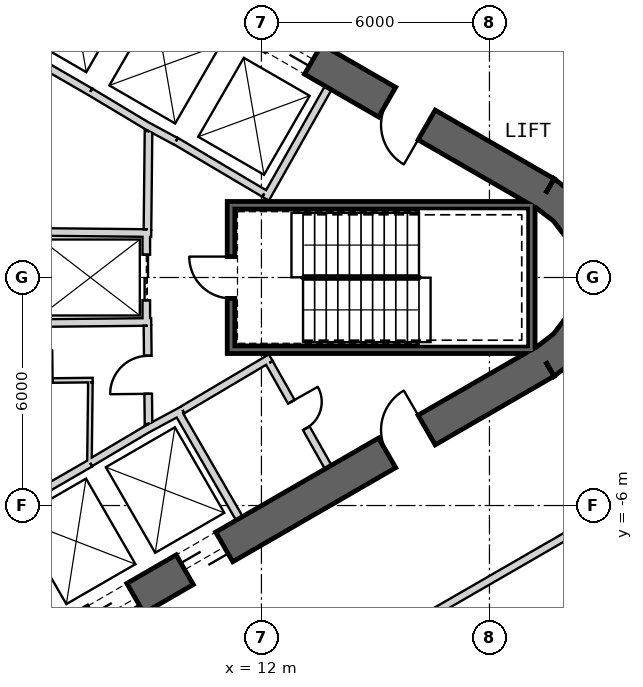
"""IFC4 building model, lengths in metres.
Left out: names, types, materials, properties, quantities, classifications, styles, units other than length and angle.
Written with IfcOpenShell. Run it as: python <this file> out.ifc"""

import sys

from ifc_helpers import new_model, si_unit, direction, frame, frame_2d, origin, place, context, subcontext, project, spatial, polyline, rectangle, outline, extrude, element, fill, save


model = new_model("IFC4")
c1 = context("Model", 3, precision=1e-05, world=origin(), true_north=direction((0.0, 1.0)))
c2 = subcontext(c1, "Body", "Model", "MODEL_VIEW")
j1 = project(units=[si_unit("LENGTHUNIT", "METRE"), si_unit("PLANEANGLEUNIT", "RADIAN")], contexts=[c1])
p1 = place(None, origin())
s1 = spatial("IfcSite", under=j1, at=p1, CompositionType="ELEMENT")
p2 = place(p1, origin())
s2 = spatial("IfcBuilding", under=s1, at=p2, CompositionType="ELEMENT")
p3 = place(p2, frame((0.0, 0.0, 45.5)))
s3 = spatial("IfcBuildingStorey", under=s2, at=p3, CompositionType="ELEMENT", Elevation=45.5)
p4 = place(p3, frame((19.475, 2.208, 0.0), z_axis=(0.0, 0.0, 1.0), x_axis=(-0.866028369851, 0.499994862586, 0.0)))
e1 = element("IfcWall", 1, at=p4, inside=s3, PredefinedType="SHEAR", context=c2, shape_type="SweptSolid", body=[
    extrude(rectangle(XDim=31.523, YDim=0.9, at=frame_2d((15.762, 0.0))), origin(), (0.0, 0.0, 1.0), 4.1),
])
p5 = place(p4, frame((7.062, 0.0, 0.0)))
e2 = element("IfcOpeningElement", 2, at=p5, cuts=e1, PredefinedType="OPENING", context=c2, shape_type="SweptSolid", body=[
    extrude(rectangle(XDim=1.2, YDim=2.4, at=frame_2d((0.6, 1.2))), frame((0.0, 0.46, 0.0), z_axis=(0.0, -1.0, 0.0), x_axis=(1.0, 0.0, 0.0)), (0.0, 0.0, 1.0), 0.92),
])
p6 = place(p4, frame((9.762, 0.0, 0.0)))
e3 = element("IfcOpeningElement", 3, at=p6, cuts=e1, PredefinedType="OPENING", context=c2, shape_type="SweptSolid", body=[
    extrude(rectangle(XDim=1.2, YDim=2.4, at=frame_2d((0.6, 1.2))), frame((0.0, 0.46, 0.0), z_axis=(0.0, -1.0, 0.0), x_axis=(1.0, 0.0, 0.0)), (0.0, 0.0, 1.0), 0.92),
])
p7 = place(p4, frame((12.462, 0.0, 0.0)))
e4 = element("IfcOpeningElement", 4, at=p7, cuts=e1, PredefinedType="OPENING", context=c2, shape_type="SweptSolid", body=[
    extrude(rectangle(XDim=1.2, YDim=2.4, at=frame_2d((0.6, 1.2))), frame((0.0, 0.46, 0.0), z_axis=(0.0, -1.0, 0.0), x_axis=(1.0, 0.0, 0.0)), (0.0, 0.0, 1.0), 0.92),
])
p8 = place(p4, frame((15.162, 0.0, 0.0)))
e5 = element("IfcOpeningElement", 5, at=p8, cuts=e1, PredefinedType="OPENING", context=c2, shape_type="SweptSolid", body=[
    extrude(rectangle(XDim=1.2, YDim=2.4, at=frame_2d((0.6, 1.2))), frame((0.0, 0.46, 0.0), z_axis=(0.0, -1.0, 0.0), x_axis=(1.0, 0.0, 0.0)), (0.0, 0.0, 1.0), 0.92),
])
p9 = place(p4, frame((17.862, 0.0, 0.0)))
e6 = element("IfcOpeningElement", 6, at=p9, cuts=e1, PredefinedType="OPENING", context=c2, shape_type="SweptSolid", body=[
    extrude(rectangle(XDim=1.2, YDim=2.4, at=frame_2d((0.6, 1.2))), frame((0.0, 0.46, 0.0), z_axis=(0.0, -1.0, 0.0), x_axis=(1.0, 0.0, 0.0)), (0.0, 0.0, 1.0), 0.92),
])
p10 = place(p4, frame((20.562, 0.0, 0.0)))
e7 = element("IfcOpeningElement", 7, at=p10, cuts=e1, PredefinedType="OPENING", context=c2, shape_type="SweptSolid", body=[
    extrude(rectangle(XDim=1.2, YDim=2.4, at=frame_2d((0.6, 1.2))), frame((0.0, 0.46, 0.0), z_axis=(0.0, -1.0, 0.0), x_axis=(1.0, 0.0, 0.0)), (0.0, 0.0, 1.0), 0.92),
])
p11 = place(p4, frame((23.262, 0.0, 0.0)))
e8 = element("IfcOpeningElement", 8, at=p11, cuts=e1, PredefinedType="OPENING", context=c2, shape_type="SweptSolid", body=[
    extrude(rectangle(XDim=1.2, YDim=2.4, at=frame_2d((0.6, 1.2))), frame((0.0, 0.46, 0.0), z_axis=(0.0, -1.0, 0.0), x_axis=(1.0, 0.0, 0.0)), (0.0, 0.0, 1.0), 0.92),
])
p12 = place(p4, frame((3.612, 0.0, 0.0)))
e9 = element("IfcOpeningElement", 9, at=p12, cuts=e1, PredefinedType="OPENING", context=c2, shape_type="SweptSolid", body=[
    extrude(rectangle(XDim=1.2, YDim=2.4, at=frame_2d((0.6, 1.2))), frame((0.0, 0.46, 0.0), z_axis=(0.0, -1.0, 0.0), x_axis=(1.0, 0.0, 0.0)), (0.0, 0.0, 1.0), 0.92),
])
p13 = place(p4, frame((26.712, 0.0, 0.0)))
e10 = element("IfcOpeningElement", 10, at=p13, cuts=e1, PredefinedType="OPENING", context=c2, shape_type="SweptSolid", body=[
    extrude(rectangle(XDim=1.2, YDim=2.4, at=frame_2d((0.6, 1.2))), frame((0.0, 0.46, 0.0), z_axis=(0.0, -1.0, 0.0), x_axis=(1.0, 0.0, 0.0)), (0.0, 0.0, 1.0), 0.92),
])
p14 = place(p3, frame((-7.825, -17.97, 0.0), z_axis=(0.0, 0.0, 1.0), x_axis=(0.866028369851, 0.499994862586, 0.0)))
e11 = element("IfcWall", 11, at=p14, inside=s3, PredefinedType="SHEAR", context=c2, shape_type="SweptSolid", body=[
    extrude(rectangle(XDim=31.523, YDim=0.9, at=frame_2d((15.762, 0.0))), origin(), (0.0, 0.0, 1.0), 4.1),
])
p15 = place(p14, frame((7.062, 0.0, 0.0)))
e12 = element("IfcOpeningElement", 12, at=p15, cuts=e11, PredefinedType="OPENING", context=c2, shape_type="SweptSolid", body=[
    extrude(rectangle(XDim=1.2, YDim=2.4, at=frame_2d((0.6, 1.2))), frame((0.0, 0.46, 0.0), z_axis=(0.0, -1.0, 0.0), x_axis=(1.0, 0.0, 0.0)), (0.0, 0.0, 1.0), 0.92),
])
p16 = place(p14, frame((9.762, 0.0, 0.0)))
e13 = element("IfcOpeningElement", 13, at=p16, cuts=e11, PredefinedType="OPENING", context=c2, shape_type="SweptSolid", body=[
    extrude(rectangle(XDim=1.2, YDim=2.4, at=frame_2d((0.6, 1.2))), frame((0.0, 0.46, 0.0), z_axis=(0.0, -1.0, 0.0), x_axis=(1.0, 0.0, 0.0)), (0.0, 0.0, 1.0), 0.92),
])
p17 = place(p14, frame((12.462, 0.0, 0.0)))
e14 = element("IfcOpeningElement", 14, at=p17, cuts=e11, PredefinedType="OPENING", context=c2, shape_type="SweptSolid", body=[
    extrude(rectangle(XDim=1.2, YDim=2.4, at=frame_2d((0.6, 1.2))), frame((0.0, 0.46, 0.0), z_axis=(0.0, -1.0, 0.0), x_axis=(1.0, 0.0, 0.0)), (0.0, 0.0, 1.0), 0.92),
])
p18 = place(p14, frame((15.162, 0.0, 0.0)))
e15 = element("IfcOpeningElement", 15, at=p18, cuts=e11, PredefinedType="OPENING", context=c2, shape_type="SweptSolid", body=[
    extrude(rectangle(XDim=1.2, YDim=2.4, at=frame_2d((0.6, 1.2))), frame((0.0, 0.46, 0.0), z_axis=(0.0, -1.0, 0.0), x_axis=(1.0, 0.0, 0.0)), (0.0, 0.0, 1.0), 0.92),
])
p19 = place(p14, frame((17.862, 0.0, 0.0)))
e16 = element("IfcOpeningElement", 16, at=p19, cuts=e11, PredefinedType="OPENING", context=c2, shape_type="SweptSolid", body=[
    extrude(rectangle(XDim=1.2, YDim=2.4, at=frame_2d((0.6, 1.2))), frame((0.0, 0.46, 0.0), z_axis=(0.0, -1.0, 0.0), x_axis=(1.0, 0.0, 0.0)), (0.0, 0.0, 1.0), 0.92),
])
p20 = place(p14, frame((20.562, 0.0, 0.0)))
e17 = element("IfcOpeningElement", 17, at=p20, cuts=e11, PredefinedType="OPENING", context=c2, shape_type="SweptSolid", body=[
    extrude(rectangle(XDim=1.2, YDim=2.4, at=frame_2d((0.6, 1.2))), frame((0.0, 0.46, 0.0), z_axis=(0.0, -1.0, 0.0), x_axis=(1.0, 0.0, 0.0)), (0.0, 0.0, 1.0), 0.92),
])
p21 = place(p14, frame((26.712, 0.0, 0.0)))
e18 = element("IfcOpeningElement", 18, at=p21, cuts=e11, PredefinedType="OPENING", context=c2, shape_type="SweptSolid", body=[
    extrude(rectangle(XDim=1.2, YDim=2.4, at=frame_2d((0.6, 1.2))), frame((0.0, 0.46, 0.0), z_axis=(0.0, -1.0, 0.0), x_axis=(1.0, 0.0, 0.0)), (0.0, 0.0, 1.0), 0.92),
])
p22 = place(p14, frame((3.612, 0.0, 0.0)))
e19 = element("IfcOpeningElement", 19, at=p22, cuts=e11, PredefinedType="OPENING", context=c2, shape_type="SweptSolid", body=[
    extrude(rectangle(XDim=1.2, YDim=2.4, at=frame_2d((0.6, 1.2))), frame((0.0, 0.46, 0.0), z_axis=(0.0, -1.0, 0.0), x_axis=(1.0, 0.0, 0.0)), (0.0, 0.0, 1.0), 0.92),
])
p23 = place(p3, origin())
e20 = element("IfcWall", 20, at=p23, inside=s3, PredefinedType="SHEAR", context=c2, shape_type="SweptSolid", body=[
    extrude(outline(polyline([(19.7, -2.598), (20.321, -2.121), (20.798, -1.5), (21.098, -0.777), (21.2, 0.0), (21.098, 0.777), (20.798, 1.5), (20.321, 2.121), (19.7, 2.598), (19.25, 1.819), (19.685, 1.485), (20.019, 1.05), (20.229, 0.543), (20.3, 0.0), (20.229, -0.543), (20.019, -1.05), (19.685, -1.485), (19.25, -1.819), (19.7, -2.598)])), origin(), (0.0, 0.0, 1.0), 4.1),
])
p24 = place(p3, frame((7.497, 4.886, 0.0), z_axis=(0.0, 0.0, 1.0), x_axis=(-0.866030989016, 0.499990325971, 0.0)))
e21 = element("IfcWall", 21, at=p24, inside=s3, PredefinedType="PLUMBINGWALL", context=c2, shape_type="SweptSolid", body=[
    extrude(rectangle(XDim=8.1, YDim=0.2, at=frame_2d((4.05, 0.0))), origin(), (0.0, 0.0, 1.0), 3.8),
])
p25 = place(p3, frame((12.11, 2.073, 0.0), z_axis=(0.0, 0.0, 1.0), x_axis=(0.49196600604, 0.870614408852, 0.0)))
e22 = element("IfcWall", 22, at=p25, inside=s3, PredefinedType="PLUMBINGWALL", context=c2, shape_type="SweptSolid", body=[
    extrude(rectangle(XDim=3.35, YDim=0.2, at=frame_2d((1.675, 0.0))), origin(), (0.0, 0.0, 1.0), 3.8),
])
p26 = place(p3, frame((12.073, 2.211, 0.0), z_axis=(0.0, 0.0, 1.0), x_axis=(-0.860438357912, 0.509554542943, 0.0)))
e23 = element("IfcWall", 23, at=p26, inside=s3, PredefinedType="PLUMBINGWALL", context=c2, shape_type="SweptSolid", body=[
    extrude(rectangle(XDim=2.7, YDim=0.2, at=frame_2d((1.35, 0.0))), origin(), (0.0, 0.0, 1.0), 3.8),
])
p27 = place(p3, frame((9.748, 3.583, 0.0), z_axis=(0.0, 0.0, 1.0), x_axis=(-0.880917147855, 0.473270513147, 0.0)))
e24 = element("IfcWall", 24, at=p27, inside=s3, PredefinedType="PLUMBINGWALL", context=c2, shape_type="SweptSolid", body=[
    extrude(rectangle(XDim=0.878, YDim=0.2, at=frame_2d((0.439, 0.0))), origin(), (0.0, 0.0, 1.0), 3.8),
])
p28 = place(p3, frame((9.079, 3.937, 0.0), z_axis=(0.0, 0.0, 1.0), x_axis=(-0.857516281273, 0.51445682749, 0.0)))
e25 = element("IfcWall", 25, at=p28, inside=s3, PredefinedType="PLUMBINGWALL", context=c2, shape_type="SweptSolid", body=[
    extrude(rectangle(XDim=1.845, YDim=0.2, at=frame_2d((0.922, 0.0))), origin(), (0.0, 0.0, 1.0), 3.8),
])
p29 = place(p3, frame((0.483, -8.936, 0.0), z_axis=(0.0, 0.0, 1.0), x_axis=(0.866030989016, 0.499990325971, 0.0)))
e26 = element("IfcWall", 26, at=p29, inside=s3, PredefinedType="PLUMBINGWALL", context=c2, shape_type="SweptSolid", body=[
    extrude(rectangle(XDim=8.1, YDim=0.2, at=frame_2d((4.05, 0.0))), origin(), (0.0, 0.0, 1.0), 3.8),
])
p30 = place(p3, frame((9.795, -3.525, 0.0), z_axis=(0.0, 0.0, 1.0), x_axis=(0.499984717929, -0.866034226713, 0.0)))
e27 = element("IfcWall", 27, at=p30, inside=s3, PredefinedType="PLUMBINGWALL", context=c2, shape_type="SweptSolid", body=[
    extrude(rectangle(XDim=3.25, YDim=0.2, at=frame_2d((1.625, 0.0))), origin(), (0.0, 0.0, 1.0), 3.8),
])
p31 = place(p3, frame((8.974, -3.999, 0.0), z_axis=(0.0, 0.0, 1.0), x_axis=(0.880907015104, 0.473289373154, 0.0)))
e28 = element("IfcWall", 28, at=p31, inside=s3, PredefinedType="PLUMBINGWALL", context=c2, shape_type="SweptSolid", body=[
    extrude(rectangle(XDim=1.078, YDim=0.2, at=frame_2d((0.539, 0.0))), origin(), (0.0, 0.0, 1.0), 3.8),
])
p32 = place(p3, frame((7.493, -4.878, 0.0), z_axis=(0.0, 0.0, 1.0), x_axis=(0.859981807212, 0.510324691999, 0.0)))
e29 = element("IfcWall", 29, at=p32, inside=s3, PredefinedType="PLUMBINGWALL", context=c2, shape_type="SweptSolid", body=[
    extrude(rectangle(XDim=1.845, YDim=0.2, at=frame_2d((0.922, 0.0))), origin(), (0.0, 0.0, 1.0), 3.8),
])
p33 = place(p3, frame((19.2, 1.9, -0.3), z_axis=(0.0, 0.0, 1.0), x_axis=(-1.0, 0.0, 0.0)))
e30 = element("IfcWall", 30, at=p33, inside=s3, PredefinedType="SHEAR", context=c2, shape_type="SweptSolid", body=[
    extrude(rectangle(XDim=8.1, YDim=0.2, at=frame_2d((4.05, 0.0))), origin(), (0.0, 0.0, 1.0), 4.1),
])
p34 = place(p3, frame((19.1, -2.0, -0.3), z_axis=(0.0, 0.0, 1.0), x_axis=(0.0, 1.0, 0.0)))
e31 = element("IfcWall", 31, at=p34, inside=s3, PredefinedType="SHEAR", context=c2, shape_type="SweptSolid", body=[
    extrude(rectangle(XDim=3.8, YDim=0.2, at=frame_2d((1.9, 0.0))), origin(), (0.0, 0.0, 1.0), 4.1),
])
p35 = place(p3, frame((11.1, -1.9, -0.3), z_axis=(0.0, 0.0, 1.0), x_axis=(1.0, 0.0, 0.0)))
e32 = element("IfcWall", 32, at=p35, inside=s3, PredefinedType="SHEAR", context=c2, shape_type="SweptSolid", body=[
    extrude(rectangle(XDim=7.9, YDim=0.2, at=frame_2d((3.95, 0.0))), origin(), (0.0, 0.0, 1.0), 4.1),
])
p36 = place(p3, frame((11.2, -1.8, -0.3), z_axis=(0.0, 0.0, 1.0), x_axis=(0.0, 1.0, 0.0)))
e33 = element("IfcWall", 33, at=p36, inside=s3, PredefinedType="SHEAR", context=c2, shape_type="SweptSolid", body=[
    extrude(rectangle(XDim=3.6, YDim=0.2, at=frame_2d((1.8, 0.0))), origin(), (0.0, 0.0, 1.0), 4.1),
])
p37 = place(p36, frame((1.25, 0.0, 0.3)))
e34 = element("IfcOpeningElement", 34, at=p37, cuts=e33, PredefinedType="OPENING", context=c2, shape_type="SweptSolid", body=[
    extrude(rectangle(XDim=1.1, YDim=2.1, at=frame_2d((0.55, 1.05))), frame((0.0, 0.11, 0.0), z_axis=(0.0, -1.0, 0.0), x_axis=(1.0, 0.0, 0.0)), (0.0, 0.0, 1.0), 0.22),
])
p38 = place(p3, frame((8.97, 1.2, 0.0), z_axis=(0.0, 0.0, 1.0), x_axis=(0.0, -1.0, 0.0)))
e35 = element("IfcWall", 35, at=p38, inside=s3, PredefinedType="PLUMBINGWALL", context=c2, shape_type="SweptSolid", body=[
    extrude(rectangle(XDim=2.4, YDim=0.2, at=frame_2d((1.2, 0.0))), origin(), (0.0, 0.0, 1.0), 3.8),
])
p39 = place(p38, frame((0.6, 0.0, 0.0)))
e36 = element("IfcOpeningElement", 36, at=p39, cuts=e35, PredefinedType="OPENING", context=c2, shape_type="SweptSolid", body=[
    extrude(rectangle(XDim=1.2, YDim=2.4, at=frame_2d((0.6, 1.2))), frame((0.0, 0.11, 0.0), z_axis=(0.0, -1.0, 0.0), x_axis=(1.0, 0.0, 0.0)), (0.0, 0.0, 1.0), 0.22),
])
p40 = place(p3, frame((6.0, 1.2, 0.0), z_axis=(0.0, 0.0, 1.0), x_axis=(0.999949988, -0.010001074852, 0.0)))
e37 = element("IfcWall", 37, at=p40, inside=s3, PredefinedType="PLUMBINGWALL", context=c2, shape_type="SweptSolid", body=[
    extrude(rectangle(XDim=3.1, YDim=0.2, at=frame_2d((1.55, 0.0))), origin(), (0.0, 0.0, 1.0), 3.8),
])
p41 = place(p3, frame((5.9, -1.201, 0.0), z_axis=(0.0, 0.0, 1.0), x_axis=(0.999950064753, 0.009993397809, 0.0)))
e38 = element("IfcWall", 38, at=p41, inside=s3, PredefinedType="PLUMBINGWALL", context=c2, shape_type="SweptSolid", body=[
    extrude(rectangle(XDim=3.2, YDim=0.2, at=frame_2d((1.6, 0.0))), origin(), (0.0, 0.0, 1.0), 3.8),
])
p42 = place(p3, frame((12.245, -2.109, 0.0), z_axis=(0.0, 0.0, 1.0), x_axis=(-0.860414880418, -0.509594185166, 0.0)))
e39 = element("IfcWall", 39, at=p42, inside=s3, PredefinedType="PARTITIONING", context=c2, shape_type="SweptSolid", body=[
    extrude(rectangle(XDim=2.7, YDim=0.2, at=frame_2d((1.35, 0.0))), origin(), (0.0, 0.0, 1.0), 3.8),
])
p43 = place(p3, frame((13.758, -4.99, 0.0), z_axis=(0.0, 0.0, 1.0), x_axis=(-0.491993409184, 0.87059892334, 0.0)))
e40 = element("IfcWall", 40, at=p43, inside=s3, PredefinedType="PARTITIONING", context=c2, shape_type="SweptSolid", body=[
    extrude(rectangle(XDim=3.15, YDim=0.2, at=frame_2d((1.575, 0.0))), origin(), (0.0, 0.0, 1.0), 3.8),
])
p44 = place(p43, frame((1.175, 0.0, 0.0)))
e41 = element("IfcOpeningElement", 41, at=p44, cuts=e40, PredefinedType="OPENING", context=c2, shape_type="SweptSolid", body=[
    extrude(rectangle(XDim=0.8, YDim=2.1, at=frame_2d((0.4, 1.05))), frame((0.0, 0.11, 0.0), z_axis=(0.0, -1.0, 0.0), x_axis=(1.0, 0.0, 0.0)), (0.0, 0.0, 1.0), 0.22),
])
p45 = place(p3, frame((9.001, 1.27, 0.0), z_axis=(0.0, 0.0, 1.0), x_axis=(0.010784614026, 0.999941844359, 0.0)))
e42 = element("IfcWall", 42, at=p45, inside=s3, PredefinedType="PARTITIONING", context=c2, shape_type="SweptSolid", body=[
    extrude(rectangle(XDim=2.581, YDim=0.2, at=frame_2d((1.291, 0.0))), origin(), (0.0, 0.0, 1.0), 3.8),
])
p46 = place(p3, frame((9.029, -3.851, 0.0), z_axis=(0.0, 0.0, 1.0), x_axis=(-0.010783593937, 0.99994185536, 0.0)))
e43 = element("IfcWall", 43, at=p46, inside=s3, PredefinedType="PARTITIONING", context=c2, shape_type="SweptSolid", body=[
    extrude(rectangle(XDim=2.581, YDim=0.2, at=frame_2d((1.291, 0.0))), origin(), (0.0, 0.0, 1.0), 3.8),
])
p47 = place(p46, frame((0.791, 0.0, 0.0)))
e44 = element("IfcOpeningElement", 44, at=p47, cuts=e43, PredefinedType="OPENING", context=c2, shape_type="SweptSolid", body=[
    extrude(rectangle(XDim=1.0, YDim=2.1, at=frame_2d((0.5, 1.05))), frame((0.0, 0.11, 0.0), z_axis=(0.0, -1.0, 0.0), x_axis=(1.0, 0.0, 0.0)), (0.0, 0.0, 1.0), 0.22),
])
p48 = place(p3, frame((7.56, -2.699, 0.0), z_axis=(0.0, 0.0, 1.0), x_axis=(-0.999948120507, -0.010186083405, 0.0)))
e45 = element("IfcWall", 45, at=p48, inside=s3, PredefinedType="PARTITIONING", context=c2, shape_type="SweptSolid", body=[
    extrude(rectangle(XDim=2.852, YDim=0.12, at=frame_2d((1.426, 0.0))), origin(), (0.0, 0.0, 1.0), 3.8),
])
p49 = place(p48, frame((1.056, 0.0, 0.0)))
e46 = element("IfcOpeningElement", 46, at=p49, cuts=e45, PredefinedType="OPENING", context=c2, shape_type="SweptSolid", body=[
    extrude(rectangle(XDim=0.8, YDim=2.1, at=frame_2d((0.4, 1.05))), frame((0.0, 0.07, 0.0), z_axis=(0.0, -1.0, 0.0), x_axis=(1.0, 0.0, 0.0)), (0.0, 0.0, 1.0), 0.14),
])
p50 = place(p3, frame((7.475, -4.865, 0.0), z_axis=(0.0, 0.0, 1.0), x_axis=(0.011716133148, 0.999931363757, 0.0)))
e47 = element("IfcWall", 47, at=p50, inside=s3, PredefinedType="PARTITIONING", context=c2, shape_type="SweptSolid", body=[
    extrude(rectangle(XDim=2.105, YDim=0.12, at=frame_2d((1.052, 0.0))), origin(), (0.0, 0.0, 1.0), 3.8),
])
p51 = place(p3, frame((21.909, 5.018, 0.0), z_axis=(0.0, 0.0, 1.0), x_axis=(-0.866054279967, 0.499949981648, 0.0)))
e48 = element("IfcWall", 48, at=p51, inside=s3, PredefinedType="PARTITIONING", context=c2, shape_type="SweptSolid", body=[
    extrude(rectangle(XDim=2.384, YDim=0.12, at=frame_2d((1.192, 0.0))), origin(), (0.0, 0.0, 1.0), 2.98),
])
p52 = place(p3, frame((-6.436, -22.075, 0.0), z_axis=(0.0, 0.0, 1.0), x_axis=(0.866022453651, 0.500005109747, 0.0)))
e49 = element("IfcWall", 49, at=p52, inside=s3, PredefinedType="PARTITIONING", context=c2, shape_type="SweptSolid", body=[
    extrude(rectangle(XDim=33.022, YDim=0.2, at=frame_2d((16.511, 0.0))), origin(), (0.0, 0.0, 1.0), 2.98),
])
p53 = place(p52, frame((20.89, 0.0, 0.0)))
e50 = element("IfcOpeningElement", 50, at=p53, cuts=e49, PredefinedType="OPENING", context=c2, shape_type="SweptSolid", body=[
    extrude(rectangle(XDim=1.0, YDim=2.1, at=frame_2d((0.5, 1.05))), frame((0.0, 0.11, 0.0), z_axis=(0.0, -1.0, 0.0), x_axis=(1.0, 0.0, 0.0)), (0.0, 0.0, 1.0), 0.22),
])
p54 = place(p52, frame((4.429, 0.0, 0.0)))
e51 = element("IfcOpeningElement", 51, at=p54, cuts=e49, PredefinedType="OPENING", context=c2, shape_type="SweptSolid", body=[
    extrude(rectangle(XDim=1.0, YDim=2.1, at=frame_2d((0.5, 1.05))), frame((0.0, 0.11, 0.0), z_axis=(0.0, -1.0, 0.0), x_axis=(1.0, 0.0, 0.0)), (0.0, 0.0, 1.0), 0.22),
])
p55 = place(p37, origin())
e52 = element("IfcDoor", 52, at=p55, inside=s3, OperationType="SINGLE_SWING_LEFT", PredefinedType="USERDEFINED", context=c2, shape_type="SweptSolid", body=[
    extrude(rectangle(XDim=1.1, YDim=2.1, at=frame_2d((0.55, 1.05))), frame((0.0, 0.025, 0.0), z_axis=(0.0, -1.0, 0.0), x_axis=(1.0, 0.0, 0.0)), (0.0, 0.0, 1.0), 0.05),
])
fill(e34, e52)
p56 = place(p47, origin())
e53 = element("IfcDoor", 53, at=p56, inside=s3, OperationType="SINGLE_SWING_LEFT", PredefinedType="USERDEFINED", context=c2, shape_type="SweptSolid", body=[
    extrude(rectangle(XDim=1.0, YDim=2.1, at=frame_2d((0.5, 1.05))), frame((0.0, 0.025, 0.0), z_axis=(0.0, -1.0, 0.0), x_axis=(1.0, 0.0, 0.0)), (0.0, 0.0, 1.0), 0.05),
])
fill(e44, e53)
p57 = place(p39, origin())
e54 = element("IfcDoor", 54, at=p57, inside=s3, OperationType="SLIDING_TO_LEFT", PredefinedType="USERDEFINED", context=c2, shape_type="SweptSolid", body=[
    extrude(rectangle(XDim=1.2, YDim=2.4, at=frame_2d((0.6, 1.2))), frame((0.0, 0.025, 0.0), z_axis=(0.0, -1.0, 0.0), x_axis=(1.0, 0.0, 0.0)), (0.0, 0.0, 1.0), 0.05),
])
fill(e36, e54)
p58 = place(p49, origin())
e55 = element("IfcDoor", 55, at=p58, inside=s3, OperationType="SINGLE_SWING_RIGHT", PredefinedType="USERDEFINED", context=c2, shape_type="SweptSolid", body=[
    extrude(rectangle(XDim=0.8, YDim=2.1, at=frame_2d((0.4, 1.05))), frame((0.0, 0.025, 0.0), z_axis=(0.0, -1.0, 0.0), x_axis=(1.0, 0.0, 0.0)), (0.0, 0.0, 1.0), 0.05),
])
fill(e46, e55)
p59 = place(p44, origin())
e56 = element("IfcDoor", 56, at=p59, inside=s3, OperationType="SINGLE_SWING_RIGHT", PredefinedType="USERDEFINED", context=c2, shape_type="SweptSolid", body=[
    extrude(rectangle(XDim=0.8, YDim=2.1, at=frame_2d((0.4, 1.05))), frame((0.0, 0.025, 0.0), z_axis=(0.0, -1.0, 0.0), x_axis=(1.0, 0.0, 0.0)), (0.0, 0.0, 1.0), 0.05),
])
fill(e41, e56)
p60 = place(p5, origin())
e57 = element("IfcDoor", 57, at=p60, inside=s3, OperationType="SLIDING_TO_LEFT", PredefinedType="USERDEFINED", context=c2, shape_type="SweptSolid", body=[
    extrude(rectangle(XDim=1.2, YDim=2.4, at=frame_2d((0.6, 1.2))), frame((0.0, 0.025, 0.0), z_axis=(0.0, -1.0, 0.0), x_axis=(1.0, 0.0, 0.0)), (0.0, 0.0, 1.0), 0.05),
])
fill(e2, e57)
p61 = place(p19, origin())
e58 = element("IfcDoor", 58, at=p61, inside=s3, OperationType="SLIDING_TO_LEFT", PredefinedType="USERDEFINED", context=c2, shape_type="SweptSolid", body=[
    extrude(rectangle(XDim=1.2, YDim=2.4, at=frame_2d((0.6, 1.2))), frame((0.0, 0.025, 0.0), z_axis=(0.0, -1.0, 0.0), x_axis=(1.0, 0.0, 0.0)), (0.0, 0.0, 1.0), 0.05),
])
fill(e16, e58)
p62 = place(p20, origin())
e59 = element("IfcDoor", 59, at=p62, inside=s3, OperationType="SLIDING_TO_LEFT", PredefinedType="USERDEFINED", context=c2, shape_type="SweptSolid", body=[
    extrude(rectangle(XDim=1.2, YDim=2.4, at=frame_2d((0.6, 1.2))), frame((0.0, 0.025, 0.0), z_axis=(0.0, -1.0, 0.0), x_axis=(1.0, 0.0, 0.0)), (0.0, 0.0, 1.0), 0.05),
])
fill(e17, e59)
p63 = place(p21, origin())
e60 = element("IfcDoor", 60, at=p63, inside=s3, OperationType="SINGLE_SWING_RIGHT", PredefinedType="USERDEFINED", context=c2, shape_type="SweptSolid", body=[
    extrude(rectangle(XDim=1.2, YDim=2.4, at=frame_2d((0.6, 1.2))), frame((0.0, 0.025, 0.0), z_axis=(0.0, -1.0, 0.0), x_axis=(1.0, 0.0, 0.0)), (0.0, 0.0, 1.0), 0.05),
])
fill(e18, e60)
p64 = place(p12, origin())
e61 = element("IfcDoor", 61, at=p64, inside=s3, OperationType="SINGLE_SWING_LEFT", PredefinedType="USERDEFINED", context=c2, shape_type="SweptSolid", body=[
    extrude(rectangle(XDim=1.2, YDim=2.4, at=frame_2d((0.6, 1.2))), frame((0.0, 0.025, 0.0), z_axis=(0.0, -1.0, 0.0), x_axis=(1.0, 0.0, 0.0)), (0.0, 0.0, 1.0), 0.05),
])
fill(e9, e61)
save(model, sys.argv[1])
